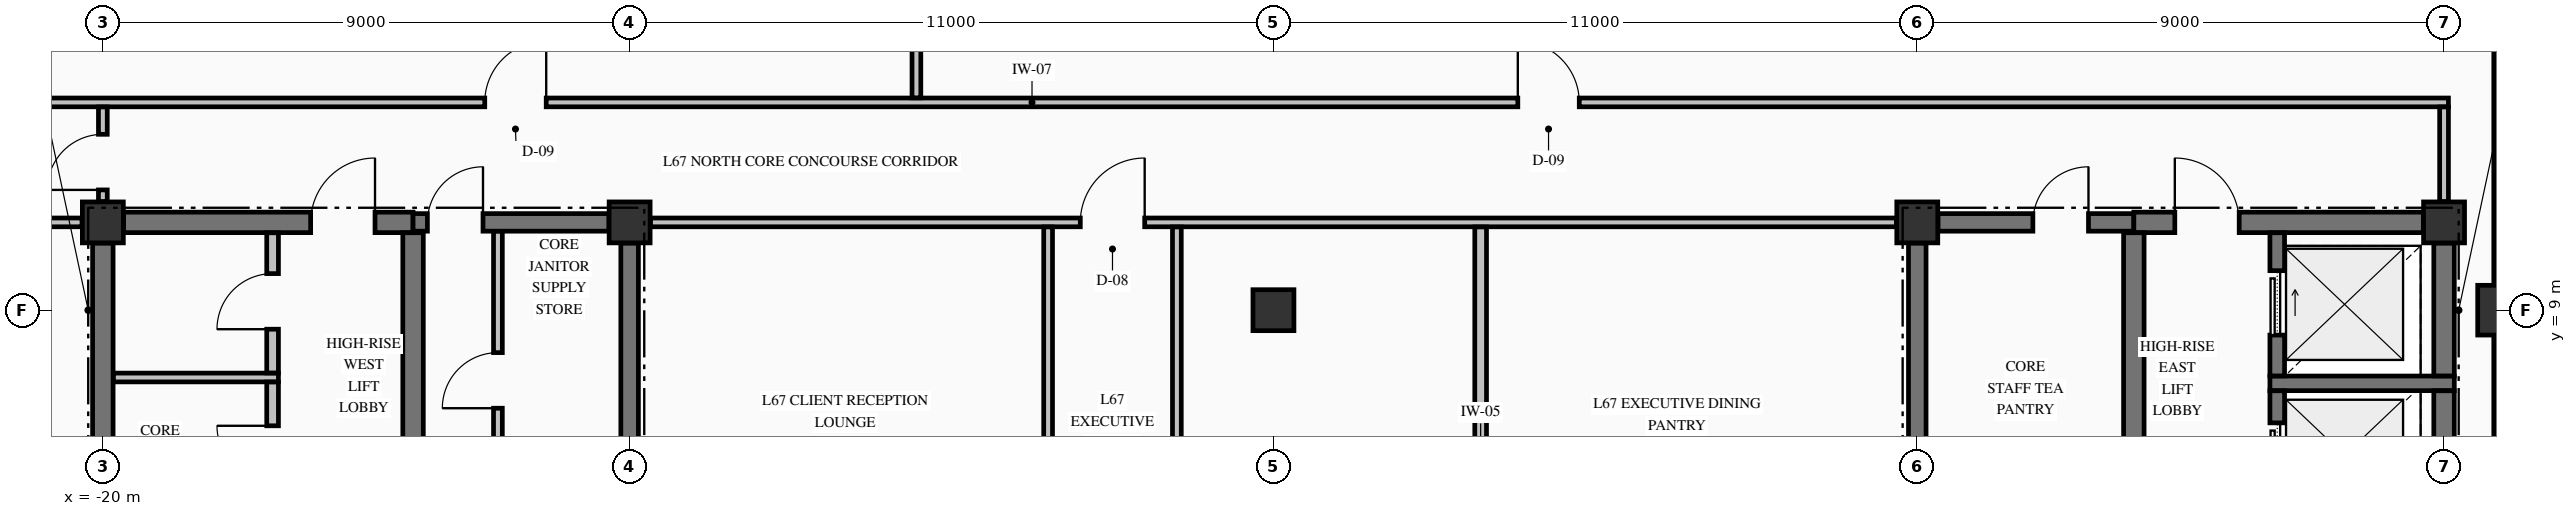
"""IFC4 building model, lengths in metres.
Left out: names, types, materials, properties, quantities, classifications, styles, units other than length and angle.
Written with IfcOpenShell. Run it as: python <this file> out.ifc"""

import sys

from ifc_helpers import new_model, si_unit, direction, frame, frame_2d, origin, origin_2d, place, context, subcontext, project, spatial, rectangle, extrude, element, fill, save


model = new_model("IFC4")
c1 = context("Model", 3, precision=1e-05, world=origin(), true_north=direction((0.0, 1.0)))
c2 = subcontext(c1, "Body", "Model", "MODEL_VIEW")
j1 = project(units=[si_unit("LENGTHUNIT", "METRE"), si_unit("PLANEANGLEUNIT", "RADIAN")], contexts=[c1])
p1 = place(None, origin())
s1 = spatial("IfcSite", under=j1, at=p1, CompositionType="ELEMENT")
p2 = place(p1, origin())
s2 = spatial("IfcBuilding", under=s1, at=p2, CompositionType="ELEMENT")
p3 = place(p2, frame((0.0, 0.0, 254.43)))
s3 = spatial("IfcBuildingStorey", under=s2, at=p3, CompositionType="ELEMENT", Elevation=254.43)
p4 = place(p3, frame((21.0, 9.0, -0.425), z_axis=(0.0, 0.0, 1.0), x_axis=(1.0, 0.0, 0.0)))
e1 = element("IfcColumn", 1, at=p4, inside=s3, PredefinedType="COLUMN", context=c2, shape_type="SweptSolid", body=[
    extrude(rectangle(XDim=0.85, YDim=0.85, at=origin_2d()), origin(), (0.0, 0.0, 1.0), 3.405),
])
for number, where, z_axis, x_axis in (
    (2, (-20.0, 10.5, -0.425), (0.0, 0.0, 1.0), (1.0, 0.0, 0.0)),
    (3, (-11.0, 10.5, -0.425), (0.0, 0.0, 1.0), (1.0, 0.0, 0.0)),
    (4, (11.0, 10.5, -0.425), (0.0, 0.0, 1.0), (1.0, 0.0, 0.0)),
    (5, (20.0, 10.5, -0.425), (0.0, 0.0, 1.0), (1.0, 0.0, 0.0)),
    (6, (0.0, 9.0, -0.425), (0.0, 0.0, 1.0), (1.0, 0.0, 0.0)),
):
    element("IfcColumn", number, at=place(p3, frame(where, z_axis=z_axis, x_axis=x_axis)), inside=s3, PredefinedType="COLUMN", context=c2, shape_type="SweptSolid", body=[
        extrude(rectangle(XDim=0.7, YDim=0.7, at=origin_2d()), origin(), (0.0, 0.0, 1.0), 3.405),
    ])
p5 = place(p3, frame((21.0, 0.455, 0.0), z_axis=(0.0, 0.0, 1.0), x_axis=(0.0, 1.0, 0.0)))
e7 = element("IfcWall", 7, at=p5, inside=s3, PredefinedType="STANDARD", context=c2, shape_type="SweptSolid", body=[
    extrude(rectangle(XDim=8.09, YDim=0.3, at=frame_2d((4.045, 0.0))), origin(), (0.0, 0.0, 1.0), 2.372),
])
p6 = place(p5, frame((3.495, 0.0, 0.0)))
e8 = element("IfcOpeningElement", 8, at=p6, cuts=e7, PredefinedType="OPENING", context=c2, shape_type="SweptSolid", body=[
    extrude(rectangle(XDim=1.1, YDim=2.15, at=frame_2d((0.55, 1.075))), frame((0.0, 0.16, 0.0), z_axis=(0.0, -1.0, 0.0), x_axis=(1.0, 0.0, 0.0)), (0.0, 0.0, 1.0), 0.32),
])
p7 = place(p3, frame((21.0, 9.455, 0.0), z_axis=(0.0, 0.0, 1.0), x_axis=(0.0, 1.0, 0.0)))
e9 = element("IfcWall", 9, at=p7, inside=s3, PredefinedType="STANDARD", context=c2, shape_type="SweptSolid", body=[
    extrude(rectangle(XDim=8.09, YDim=0.3, at=frame_2d((4.045, 0.0))), origin(), (0.0, 0.0, 1.0), 2.372),
])
p8 = place(p3, frame((17.025, 7.75, 0.0), z_axis=(0.0, 0.0, 1.0), x_axis=(1.0, 0.0, 0.0)))
e10 = element("IfcWall", 10, at=p8, inside=s3, PredefinedType="SOLIDWALL", context=c2, shape_type="SweptSolid", body=[
    extrude(rectangle(XDim=3.15, YDim=0.25, at=frame_2d((1.575, 0.0))), origin(), (0.0, 0.0, 1.0), 2.98),
])
p9 = place(p3, frame((-19.646, 10.5, 0.0), z_axis=(0.0, 0.0, 1.0), x_axis=(1.0, 0.0, 0.0)))
e11 = element("IfcWall", 11, at=p9, inside=s3, PredefinedType="SHEAR", context=c2, shape_type="SweptSolid", body=[
    extrude(rectangle(XDim=4.946, YDim=0.35, at=frame_2d((2.473, 0.0))), origin(), (0.0, 0.0, 1.0), 2.98),
])
p10 = place(p9, frame((3.196, 0.0, 0.0)))
e12 = element("IfcOpeningElement", 12, at=p10, cuts=e11, PredefinedType="OPENING", context=c2, shape_type="SweptSolid", body=[
    extrude(rectangle(XDim=1.1, YDim=2.15, at=frame_2d((0.55, 1.075))), frame((0.0, 0.185, 0.0), z_axis=(0.0, -1.0, 0.0), x_axis=(1.0, 0.0, 0.0)), (0.0, 0.0, 1.0), 0.37),
])
p11 = place(p3, frame((-14.7, 10.5, 0.0), z_axis=(0.0, 0.0, 1.0), x_axis=(1.0, 0.0, 0.0)))
e13 = element("IfcWall", 13, at=p11, inside=s3, PredefinedType="SHEAR", context=c2, shape_type="SweptSolid", body=[
    extrude(rectangle(XDim=3.346, YDim=0.3, at=frame_2d((1.673, 0.0))), origin(), (0.0, 0.0, 1.0), 2.98),
])
p12 = place(p11, frame((0.245, 0.0, 0.0)))
e14 = element("IfcOpeningElement", 14, at=p12, cuts=e13, PredefinedType="OPENING", context=c2, shape_type="SweptSolid", body=[
    extrude(rectangle(XDim=0.95, YDim=2.15, at=frame_2d((0.475, 1.075))), frame((0.0, 0.16, 0.0), z_axis=(0.0, -1.0, 0.0), x_axis=(1.0, 0.0, 0.0)), (0.0, 0.0, 1.0), 0.32),
])
p13 = place(p3, frame((11.354, 10.5, 0.0), z_axis=(0.0, 0.0, 1.0), x_axis=(1.0, 0.0, 0.0)))
e15 = element("IfcWall", 15, at=p13, inside=s3, PredefinedType="SHEAR", context=c2, shape_type="SweptSolid", body=[
    extrude(rectangle(XDim=3.346, YDim=0.3, at=frame_2d((1.673, 0.0))), origin(), (0.0, 0.0, 1.0), 2.98),
])
p14 = place(p13, frame((1.621, 0.0, 0.0)))
e16 = element("IfcOpeningElement", 16, at=p14, cuts=e15, PredefinedType="OPENING", context=c2, shape_type="SweptSolid", body=[
    extrude(rectangle(XDim=0.95, YDim=2.15, at=frame_2d((0.475, 1.075))), frame((0.0, 0.16, 0.0), z_axis=(0.0, -1.0, 0.0), x_axis=(1.0, 0.0, 0.0)), (0.0, 0.0, 1.0), 0.32),
])
p15 = place(p3, frame((14.7, 10.5, 0.0), z_axis=(0.0, 0.0, 1.0), x_axis=(1.0, 0.0, 0.0)))
e17 = element("IfcWall", 17, at=p15, inside=s3, PredefinedType="SHEAR", context=c2, shape_type="SweptSolid", body=[
    extrude(rectangle(XDim=4.946, YDim=0.35, at=frame_2d((2.473, 0.0))), origin(), (0.0, 0.0, 1.0), 2.98),
])
p16 = place(p15, frame((0.7, 0.0, 0.0)))
e18 = element("IfcOpeningElement", 18, at=p16, cuts=e17, PredefinedType="OPENING", context=c2, shape_type="SweptSolid", body=[
    extrude(rectangle(XDim=1.1, YDim=2.15, at=frame_2d((0.55, 1.075))), frame((0.0, 0.185, 0.0), z_axis=(0.0, -1.0, 0.0), x_axis=(1.0, 0.0, 0.0)), (0.0, 0.0, 1.0), 0.37),
])
p17 = place(p3, frame((-19.822, 7.85, 0.0), z_axis=(0.0, 0.0, 1.0), x_axis=(1.0, 0.0, 0.0)))
e19 = element("IfcWall", 19, at=p17, inside=s3, PredefinedType="PARTITIONING", context=c2, shape_type="SweptSolid", body=[
    extrude(rectangle(XDim=2.822, YDim=0.15, at=frame_2d((1.411, 0.0))), origin(), (0.0, 0.0, 1.0), 2.98),
])
p18 = place(p3, frame((-25.835, 10.5, 0.0), z_axis=(0.0, 0.0, 1.0), x_axis=(1.0, 0.0, 0.0)))
e20 = element("IfcWall", 20, at=p18, inside=s3, PredefinedType="PARTITIONING", context=c2, shape_type="SweptSolid", body=[
    extrude(rectangle(XDim=5.479, YDim=0.15, at=frame_2d((2.74, 0.0))), origin(), (0.0, 0.0, 1.0), 2.98),
])
p19 = place(p18, frame((2.335, 0.0, 0.0)))
e21 = element("IfcOpeningElement", 21, at=p19, cuts=e20, PredefinedType="OPENING", context=c2, shape_type="SweptSolid", body=[
    extrude(rectangle(XDim=1.0, YDim=2.15, at=frame_2d((0.5, 1.075))), frame((0.0, 0.085, 0.0), z_axis=(0.0, -1.0, 0.0), x_axis=(1.0, 0.0, 0.0)), (0.0, 0.0, 1.0), 0.17),
])
p20 = place(p3, frame((-10.644, 10.5, 0.0), z_axis=(0.0, 0.0, 1.0), x_axis=(1.0, 0.0, 0.0)))
e22 = element("IfcWall", 22, at=p20, inside=s3, PredefinedType="PARTITIONING", context=c2, shape_type="SweptSolid", body=[
    extrude(rectangle(XDim=21.288, YDim=0.15, at=frame_2d((10.644, 0.0))), origin(), (0.0, 0.0, 1.0), 2.98),
])
p21 = place(p20, frame((7.344, 0.0, 0.0)))
e23 = element("IfcOpeningElement", 23, at=p21, cuts=e22, PredefinedType="OPENING", context=c2, shape_type="SweptSolid", body=[
    extrude(rectangle(XDim=1.1, YDim=2.15, at=frame_2d((0.55, 1.075))), frame((0.0, 0.085, 0.0), z_axis=(0.0, -1.0, 0.0), x_axis=(1.0, 0.0, 0.0)), (0.0, 0.0, 1.0), 0.17),
])
p22 = place(p3, frame((-25.835, 12.55, 0.0), z_axis=(0.0, 0.0, 1.0), x_axis=(1.0, 0.0, 0.0)))
e24 = element("IfcWall", 24, at=p22, inside=s3, PredefinedType="PARTITIONING", context=c2, shape_type="SweptSolid", body=[
    extrude(rectangle(XDim=45.91, YDim=0.15, at=frame_2d((22.955, 0.0))), origin(), (0.0, 0.0, 1.0), 2.98),
])
p23 = place(p22, frame((12.36, 0.0, 0.0)))
e25 = element("IfcOpeningElement", 25, at=p23, cuts=e24, PredefinedType="OPENING", context=c2, shape_type="SweptSolid", body=[
    extrude(rectangle(XDim=1.05, YDim=2.15, at=frame_2d((0.525, 1.075))), frame((0.0, 0.085, 0.0), z_axis=(0.0, -1.0, 0.0), x_axis=(1.0, 0.0, 0.0)), (0.0, 0.0, 1.0), 0.17),
])
p24 = place(p22, frame((30.01, 0.0, 0.0)))
e26 = element("IfcOpeningElement", 26, at=p24, cuts=e24, PredefinedType="OPENING", context=c2, shape_type="SweptSolid", body=[
    extrude(rectangle(XDim=1.05, YDim=2.15, at=frame_2d((0.525, 1.075))), frame((0.0, 0.085, 0.0), z_axis=(0.0, -1.0, 0.0), x_axis=(1.0, 0.0, 0.0)), (0.0, 0.0, 1.0), 0.17),
])
p25 = place(p3, frame((-20.0, 5.327, 0.0), z_axis=(0.0, 0.0, 1.0), x_axis=(0.0, 1.0, 0.0)))
e27 = element("IfcWall", 27, at=p25, inside=s3, PredefinedType="SHEAR", context=c2, shape_type="SweptSolid", body=[
    extrude(rectangle(XDim=4.819, YDim=0.35, at=frame_2d((2.41, 0.0))), origin(), (0.0, 0.0, 1.0), 2.98),
])
p26 = place(p3, frame((-14.7, 5.852, 0.0), z_axis=(0.0, 0.0, 1.0), x_axis=(0.0, 1.0, 0.0)))
e28 = element("IfcWall", 28, at=p26, inside=s3, PredefinedType="SHEAR", context=c2, shape_type="SweptSolid", body=[
    extrude(rectangle(XDim=4.471, YDim=0.35, at=frame_2d((2.235, 0.0))), origin(), (0.0, 0.0, 1.0), 2.98),
])
for number, where, z_axis, x_axis in (
    (29, (-11.0, 5.852, 0.0), (0.0, 0.0, 1.0), (0.0, 1.0, 0.0)),
    (30, (11.0, 5.852, 0.0), (0.0, 0.0, 1.0), (0.0, 1.0, 0.0)),
):
    element("IfcWall", number, at=place(p3, frame(where, z_axis=z_axis, x_axis=x_axis)), inside=s3, PredefinedType="SHEAR", context=c2, shape_type="SweptSolid", body=[
        extrude(rectangle(XDim=4.294, YDim=0.3, at=frame_2d((2.147, 0.0))), origin(), (0.0, 0.0, 1.0), 2.98),
    ])
p27 = place(p3, frame((14.7, 5.852, 0.0), z_axis=(0.0, 0.0, 1.0), x_axis=(0.0, 1.0, 0.0)))
e31 = element("IfcWall", 31, at=p27, inside=s3, PredefinedType="SHEAR", context=c2, shape_type="SweptSolid", body=[
    extrude(rectangle(XDim=4.471, YDim=0.35, at=frame_2d((2.235, 0.0))), origin(), (0.0, 0.0, 1.0), 2.98),
])
p28 = place(p3, frame((17.15, 5.427, 0.0), z_axis=(0.0, 0.0, 1.0), x_axis=(0.0, 1.0, 0.0)))
e32 = element("IfcWall", 32, at=p28, inside=s3, PredefinedType="SOLIDWALL", context=c2, shape_type="SweptSolid", body=[
    extrude(rectangle(XDim=2.196, YDim=0.25, at=frame_2d((1.098, 0.0))), origin(), (0.0, 0.0, 1.0), 2.98),
])
p29 = place(p28, frame((0.548, 0.0, 0.0)))
e33 = element("IfcOpeningElement", 33, at=p29, cuts=e32, PredefinedType="OPENING", context=c2, shape_type="SweptSolid", body=[
    extrude(rectangle(XDim=1.1, YDim=2.2, at=frame_2d((0.55, 1.1))), frame((0.0, 0.135, 0.0), z_axis=(0.0, -1.0, 0.0), x_axis=(1.0, 0.0, 0.0)), (0.0, 0.0, 1.0), 0.27),
])
p30 = place(p3, frame((17.15, 7.877, 0.0), z_axis=(0.0, 0.0, 1.0), x_axis=(0.0, 1.0, 0.0)))
e34 = element("IfcWall", 34, at=p30, inside=s3, PredefinedType="SOLIDWALL", context=c2, shape_type="SweptSolid", body=[
    extrude(rectangle(XDim=2.446, YDim=0.25, at=frame_2d((1.223, 0.0))), origin(), (0.0, 0.0, 1.0), 2.98),
])
p31 = place(p30, frame((0.698, 0.0, 0.0)))
e35 = element("IfcOpeningElement", 35, at=p31, cuts=e34, PredefinedType="OPENING", context=c2, shape_type="SweptSolid", body=[
    extrude(rectangle(XDim=1.1, YDim=2.2, at=frame_2d((0.55, 1.1))), frame((0.0, 0.135, 0.0), z_axis=(0.0, -1.0, 0.0), x_axis=(1.0, 0.0, 0.0)), (0.0, 0.0, 1.0), 0.27),
])
p32 = place(p3, frame((20.0, 5.427, 0.0), z_axis=(0.0, 0.0, 1.0), x_axis=(0.0, 1.0, 0.0)))
e36 = element("IfcWall", 36, at=p32, inside=s3, PredefinedType="SHEAR", context=c2, shape_type="SweptSolid", body=[
    extrude(rectangle(XDim=2.196, YDim=0.35, at=frame_2d((1.098, 0.0))), origin(), (0.0, 0.0, 1.0), 2.98),
])
p33 = place(p3, frame((20.0, 7.877, 0.0), z_axis=(0.0, 0.0, 1.0), x_axis=(0.0, 1.0, 0.0)))
e37 = element("IfcWall", 37, at=p33, inside=s3, PredefinedType="SHEAR", context=c2, shape_type="SweptSolid", body=[
    extrude(rectangle(XDim=2.269, YDim=0.35, at=frame_2d((1.135, 0.0))), origin(), (0.0, 0.0, 1.0), 2.98),
])
p34 = place(p3, frame((-20.0, 10.856, 0.0), z_axis=(0.0, 0.0, 1.0), x_axis=(0.0, 1.0, 0.0)))
e38 = element("IfcWall", 38, at=p34, inside=s3, PredefinedType="PARTITIONING", context=c2, shape_type="SweptSolid", body=[
    extrude(rectangle(XDim=1.616, YDim=0.15, at=frame_2d((0.808, 0.0))), origin(), (0.0, 0.0, 1.0), 2.98),
])
p35 = place(p34, frame((0.199, 0.0, 0.0)))
e39 = element("IfcOpeningElement", 39, at=p35, cuts=e38, PredefinedType="OPENING", context=c2, shape_type="SweptSolid", body=[
    extrude(rectangle(XDim=0.95, YDim=2.15, at=frame_2d((0.475, 1.075))), frame((0.0, 0.085, 0.0), z_axis=(0.0, -1.0, 0.0), x_axis=(1.0, 0.0, 0.0)), (0.0, 0.0, 1.0), 0.17),
])
p36 = place(p3, frame((-17.1, 5.328, 0.0), z_axis=(0.0, 0.0, 1.0), x_axis=(0.0, 1.0, 0.0)))
e40 = element("IfcWall", 40, at=p36, inside=s3, PredefinedType="PARTITIONING", context=c2, shape_type="SweptSolid", body=[
    extrude(rectangle(XDim=2.444, YDim=0.2, at=frame_2d((1.222, 0.0))), origin(), (0.0, 0.0, 1.0), 2.98),
])
p37 = place(p36, frame((0.747, 0.0, 0.0)))
e41 = element("IfcOpeningElement", 41, at=p37, cuts=e40, PredefinedType="OPENING", context=c2, shape_type="SweptSolid", body=[
    extrude(rectangle(XDim=0.95, YDim=2.15, at=frame_2d((0.475, 1.075))), frame((0.0, 0.11, 0.0), z_axis=(0.0, -1.0, 0.0), x_axis=(1.0, 0.0, 0.0)), (0.0, 0.0, 1.0), 0.22),
])
p38 = place(p3, frame((-17.1, 7.928, 0.0), z_axis=(0.0, 0.0, 1.0), x_axis=(0.0, 1.0, 0.0)))
e42 = element("IfcWall", 42, at=p38, inside=s3, PredefinedType="PARTITIONING", context=c2, shape_type="SweptSolid", body=[
    extrude(rectangle(XDim=2.394, YDim=0.2, at=frame_2d((1.197, 0.0))), origin(), (0.0, 0.0, 1.0), 2.98),
])
p39 = place(p38, frame((0.747, 0.0, 0.0)))
e43 = element("IfcOpeningElement", 43, at=p39, cuts=e42, PredefinedType="OPENING", context=c2, shape_type="SweptSolid", body=[
    extrude(rectangle(XDim=0.95, YDim=2.15, at=frame_2d((0.475, 1.075))), frame((0.0, 0.11, 0.0), z_axis=(0.0, -1.0, 0.0), x_axis=(1.0, 0.0, 0.0)), (0.0, 0.0, 1.0), 0.22),
])
p40 = place(p3, frame((-13.25, 5.853, 0.0), z_axis=(0.0, 0.0, 1.0), x_axis=(0.0, 1.0, 0.0)))
e44 = element("IfcWall", 44, at=p40, inside=s3, PredefinedType="PARTITIONING", context=c2, shape_type="SweptSolid", body=[
    extrude(rectangle(XDim=4.494, YDim=0.15, at=frame_2d((2.247, 0.0))), origin(), (0.0, 0.0, 1.0), 2.98),
])
p41 = place(p40, frame((1.472, 0.0, 0.0)))
e45 = element("IfcOpeningElement", 45, at=p41, cuts=e44, PredefinedType="OPENING", context=c2, shape_type="SweptSolid", body=[
    extrude(rectangle(XDim=0.95, YDim=2.15, at=frame_2d((0.475, 1.075))), frame((0.0, 0.085, 0.0), z_axis=(0.0, -1.0, 0.0), x_axis=(1.0, 0.0, 0.0)), (0.0, 0.0, 1.0), 0.17),
])
p42 = place(p3, frame((-6.1, 12.628, 0.0), z_axis=(0.0, 0.0, 1.0), x_axis=(0.0, 1.0, 0.0)))
e46 = element("IfcWall", 46, at=p42, inside=s3, PredefinedType="PARTITIONING", context=c2, shape_type="SweptSolid", body=[
    extrude(rectangle(XDim=10.707, YDim=0.15, at=frame_2d((5.354, 0.0))), origin(), (0.0, 0.0, 1.0), 2.98),
])
for number, where, z_axis, x_axis in (
    (47, (-3.85, 2.978, 0.0), (0.0, 0.0, 1.0), (0.0, 1.0, 0.0)),
    (48, (-1.65, 2.978, 0.0), (0.0, 0.0, 1.0), (0.0, 1.0, 0.0)),
):
    element("IfcWall", number, at=place(p3, frame(where, z_axis=z_axis, x_axis=x_axis)), inside=s3, PredefinedType="PARTITIONING", context=c2, shape_type="SweptSolid", body=[
        extrude(rectangle(XDim=7.444, YDim=0.15, at=frame_2d((3.722, 0.0))), origin(), (0.0, 0.0, 1.0), 2.98),
    ])
p43 = place(p3, frame((3.54, 2.978, 0.0), z_axis=(0.0, 0.0, 1.0), x_axis=(0.0, 1.0, 0.0)))
e49 = element("IfcWall", 49, at=p43, inside=s3, PredefinedType="PARTITIONING", context=c2, shape_type="SweptSolid", body=[
    extrude(rectangle(XDim=7.444, YDim=0.2, at=frame_2d((3.722, 0.0))), origin(), (0.0, 0.0, 1.0), 2.98),
])
p44 = place(p3, frame((20.0, 10.856, 0.0), z_axis=(0.0, 0.0, 1.0), x_axis=(0.0, 1.0, 0.0)))
e50 = element("IfcWall", 50, at=p44, inside=s3, PredefinedType="PARTITIONING", context=c2, shape_type="SweptSolid", body=[
    extrude(rectangle(XDim=1.616, YDim=0.15, at=frame_2d((0.808, 0.0))), origin(), (0.0, 0.0, 1.0), 2.57),
])
p45 = place(p12, origin())
e51 = element("IfcDoor", 51, at=p45, inside=s3, OperationType="SINGLE_SWING_RIGHT", PredefinedType="DOOR", context=c2, shape_type="SweptSolid", body=[
    extrude(rectangle(XDim=0.95, YDim=2.15, at=frame_2d((0.475, 1.075))), frame((0.0, 0.025, 0.0), z_axis=(0.0, -1.0, 0.0), x_axis=(1.0, 0.0, 0.0)), (0.0, 0.0, 1.0), 0.05),
])
fill(e14, e51)
p46 = place(p41, origin())
e52 = element("IfcDoor", 52, at=p46, inside=s3, OperationType="SINGLE_SWING_LEFT", PredefinedType="DOOR", context=c2, shape_type="SweptSolid", body=[
    extrude(rectangle(XDim=0.95, YDim=2.15, at=frame_2d((0.475, 1.075))), frame((0.0, 0.025, 0.0), z_axis=(0.0, -1.0, 0.0), x_axis=(1.0, 0.0, 0.0)), (0.0, 0.0, 1.0), 0.05),
])
fill(e45, e52)
p47 = place(p14, origin())
e53 = element("IfcDoor", 53, at=p47, inside=s3, OperationType="SINGLE_SWING_RIGHT", PredefinedType="DOOR", context=c2, shape_type="SweptSolid", body=[
    extrude(rectangle(XDim=0.95, YDim=2.15, at=frame_2d((0.475, 1.075))), frame((0.0, 0.025, 0.0), z_axis=(0.0, -1.0, 0.0), x_axis=(1.0, 0.0, 0.0)), (0.0, 0.0, 1.0), 0.05),
])
fill(e16, e53)
p48 = place(p10, origin())
e54 = element("IfcDoor", 54, at=p48, inside=s3, OperationType="SINGLE_SWING_RIGHT", PredefinedType="DOOR", context=c2, shape_type="SweptSolid", body=[
    extrude(rectangle(XDim=1.1, YDim=2.15, at=frame_2d((0.55, 1.075))), frame((0.0, 0.025, 0.0), z_axis=(0.0, -1.0, 0.0), x_axis=(1.0, 0.0, 0.0)), (0.0, 0.0, 1.0), 0.05),
])
fill(e12, e54)
p49 = place(p39, origin())
e55 = element("IfcDoor", 55, at=p49, inside=s3, OperationType="SINGLE_SWING_LEFT", PredefinedType="DOOR", context=c2, shape_type="SweptSolid", body=[
    extrude(rectangle(XDim=0.95, YDim=2.15, at=frame_2d((0.475, 1.075))), frame((0.0, 0.025, 0.0), z_axis=(0.0, -1.0, 0.0), x_axis=(1.0, 0.0, 0.0)), (0.0, 0.0, 1.0), 0.05),
])
fill(e43, e55)
p50 = place(p37, origin())
e56 = element("IfcDoor", 56, at=p50, inside=s3, OperationType="SINGLE_SWING_RIGHT", PredefinedType="DOOR", context=c2, shape_type="SweptSolid", body=[
    extrude(rectangle(XDim=0.95, YDim=2.15, at=frame_2d((0.475, 1.075))), frame((0.0, 0.025, 0.0), z_axis=(0.0, -1.0, 0.0), x_axis=(1.0, 0.0, 0.0)), (0.0, 0.0, 1.0), 0.05),
])
fill(e41, e56)
p51 = place(p29, origin())
e57 = element("IfcDoor", 57, at=p51, inside=s3, OperationType="SLIDING_TO_RIGHT", PredefinedType="DOOR", context=c2, shape_type="SweptSolid", body=[
    extrude(rectangle(XDim=1.1, YDim=2.2, at=frame_2d((0.55, 1.1))), frame((0.0, 0.025, 0.0), z_axis=(0.0, -1.0, 0.0), x_axis=(1.0, 0.0, 0.0)), (0.0, 0.0, 1.0), 0.05),
])
fill(e33, e57)
p52 = place(p31, origin())
e58 = element("IfcDoor", 58, at=p52, inside=s3, OperationType="SLIDING_TO_RIGHT", PredefinedType="DOOR", context=c2, shape_type="SweptSolid", body=[
    extrude(rectangle(XDim=1.1, YDim=2.2, at=frame_2d((0.55, 1.1))), frame((0.0, 0.025, 0.0), z_axis=(0.0, -1.0, 0.0), x_axis=(1.0, 0.0, 0.0)), (0.0, 0.0, 1.0), 0.05),
])
fill(e35, e58)
p53 = place(p16, origin())
e59 = element("IfcDoor", 59, at=p53, inside=s3, OperationType="SINGLE_SWING_LEFT", PredefinedType="DOOR", context=c2, shape_type="SweptSolid", body=[
    extrude(rectangle(XDim=1.1, YDim=2.15, at=frame_2d((0.55, 1.075))), frame((0.0, 0.025, 0.0), z_axis=(0.0, -1.0, 0.0), x_axis=(1.0, 0.0, 0.0)), (0.0, 0.0, 1.0), 0.05),
])
fill(e18, e59)
p54 = place(p21, origin())
e60 = element("IfcDoor", 60, at=p54, inside=s3, OperationType="SINGLE_SWING_RIGHT", PredefinedType="DOOR", context=c2, shape_type="SweptSolid", body=[
    extrude(rectangle(XDim=1.1, YDim=2.15, at=frame_2d((0.55, 1.075))), frame((0.0, 0.025, 0.0), z_axis=(0.0, -1.0, 0.0), x_axis=(1.0, 0.0, 0.0)), (0.0, 0.0, 1.0), 0.05),
])
fill(e23, e60)
p55 = place(p23, origin())
e61 = element("IfcDoor", 61, at=p55, inside=s3, OperationType="SINGLE_SWING_RIGHT", PredefinedType="DOOR", context=c2, shape_type="SweptSolid", body=[
    extrude(rectangle(XDim=1.05, YDim=2.15, at=frame_2d((0.525, 1.075))), frame((0.0, 0.025, 0.0), z_axis=(0.0, -1.0, 0.0), x_axis=(1.0, 0.0, 0.0)), (0.0, 0.0, 1.0), 0.05),
])
fill(e25, e61)
p56 = place(p24, origin())
e62 = element("IfcDoor", 62, at=p56, inside=s3, OperationType="SINGLE_SWING_LEFT", PredefinedType="DOOR", context=c2, shape_type="SweptSolid", body=[
    extrude(rectangle(XDim=1.05, YDim=2.15, at=frame_2d((0.525, 1.075))), frame((0.0, 0.025, 0.0), z_axis=(0.0, -1.0, 0.0), x_axis=(1.0, 0.0, 0.0)), (0.0, 0.0, 1.0), 0.05),
])
fill(e26, e62)
p57 = place(p35, origin())
e63 = element("IfcDoor", 63, at=p57, inside=s3, OperationType="SINGLE_SWING_LEFT", PredefinedType="DOOR", context=c2, shape_type="SweptSolid", body=[
    extrude(rectangle(XDim=0.95, YDim=2.15, at=frame_2d((0.475, 1.075))), frame((0.0, 0.025, 0.0), z_axis=(0.0, -1.0, 0.0), x_axis=(1.0, 0.0, 0.0)), (0.0, 0.0, 1.0), 0.05),
])
fill(e39, e63)
save(model, sys.argv[1])
